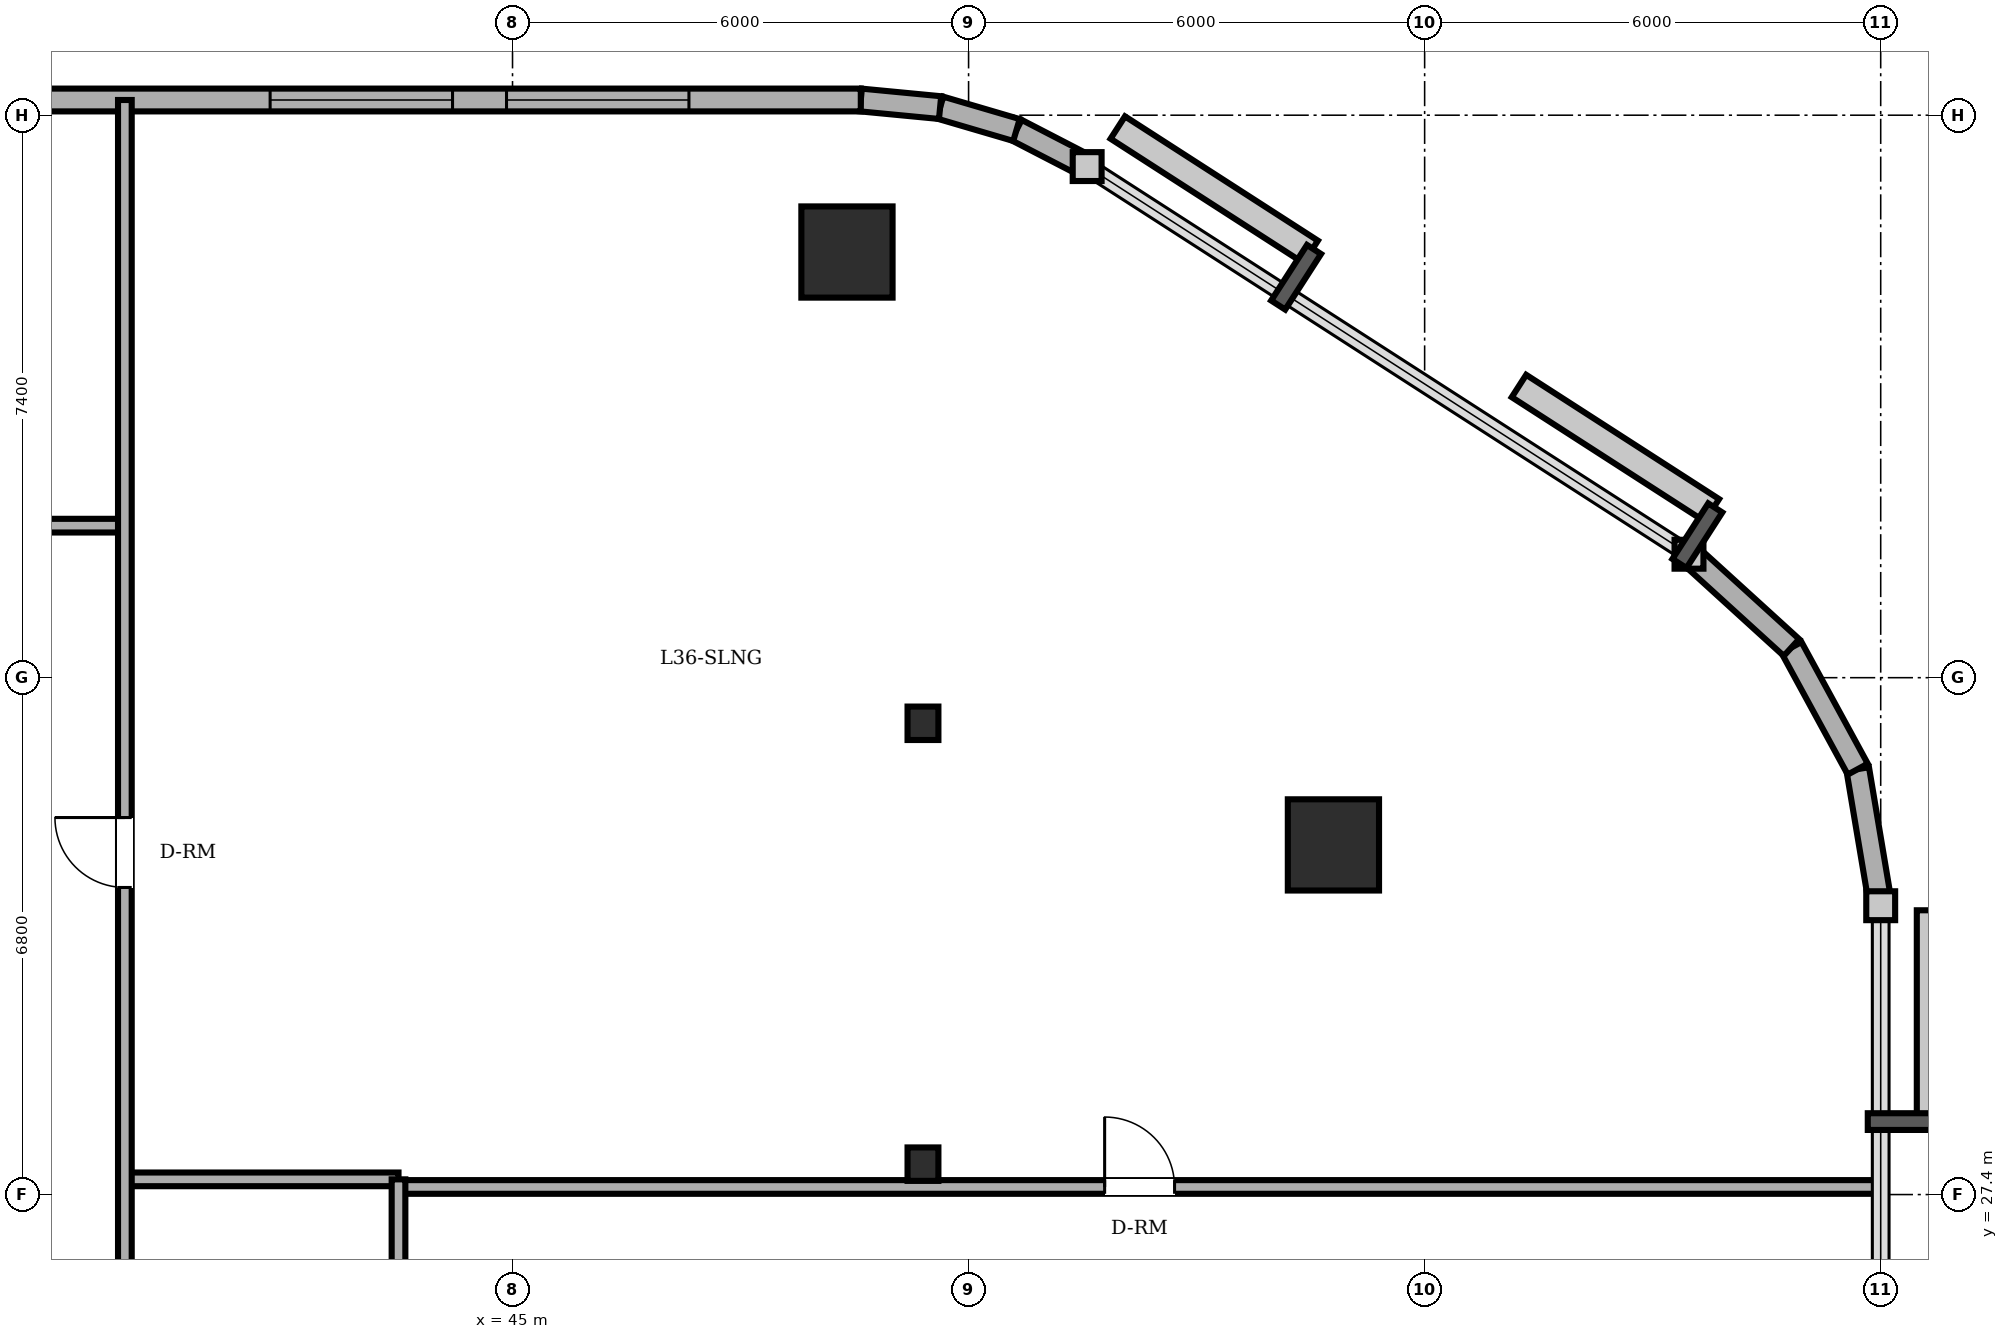
"""IFC4 building model, lengths in metres.
Left out: names, types, materials, properties, quantities, classifications, styles, units other than length and angle.
Written with IfcOpenShell. Run it as: python <this file> out.ifc"""

import sys

from ifc_helpers import new_model, si_unit, direction, frame, frame_2d, origin, origin_2d, place, context, subcontext, project, spatial, rectangle, circle, i_section, extrude, element, fill, save


model = new_model("IFC4")
c1 = context("Model", 3, precision=1e-05, world=origin(), true_north=direction((0.0, 1.0)))
c2 = subcontext(c1, "Body", "Model", "MODEL_VIEW")
j1 = project(units=[si_unit("LENGTHUNIT", "METRE"), si_unit("PLANEANGLEUNIT", "RADIAN")], contexts=[c1])
p1 = place(None, origin())
s1 = spatial("IfcSite", under=j1, at=p1, CompositionType="ELEMENT")
p2 = place(p1, origin())
s2 = spatial("IfcBuilding", under=s1, at=p2, CompositionType="ELEMENT")
p3 = place(p2, frame((0.0, 0.0, 138.7)))
s3 = spatial("IfcBuildingStorey", under=s2, at=p3, CompositionType="ELEMENT", Elevation=138.7)
for number, where, z_axis, x_axis in (
    (1, (55.8, 32.0, 0.0), (0.0, 0.0, 1.0), (1.0, 0.0, 0.0)),
    (2, (49.4, 39.8, 0.0), (0.0, 0.0, 1.0), (1.0, 0.0, 0.0)),
):
    element("IfcColumn", number, at=place(p3, frame(where, z_axis=z_axis, x_axis=x_axis)), inside=s3, PredefinedType="COLUMN", context=c2, shape_type="SweptSolid", body=[
        extrude(circle(Radius=0.6, at=origin_2d()), origin(), (0.0, 0.0, 1.0), 5.1),
    ])
for number, where, z_axis, x_axis in (
    (3, (50.4, 27.8, 0.0), (0.0, 0.0, 1.0), (1.0, 0.0, 0.0)),
    (4, (50.4, 33.6, 0.0), (0.0, 0.0, 1.0), (1.0, 0.0, 0.0)),
):
    element("IfcColumn", number, at=place(p3, frame(where, z_axis=z_axis, x_axis=x_axis)), inside=s3, PredefinedType="COLUMN", context=c2, shape_type="SweptSolid", body=[
        extrude(i_section(OverallWidth=0.406, OverallDepth=0.44, WebThickness=0.024, FlangeThickness=0.039, FilletRadius=0.015, at=origin_2d()), origin(), (0.0, 0.0, 1.0), 5.1),
    ])
p4 = place(p3, frame((63.0, 31.2, 0.0), z_axis=(0.0, 0.0, 1.0), x_axis=(-0.165724081207, 0.986172159873, 0.0)))
e5 = element("IfcWall", 5, at=p4, inside=s3, PredefinedType="SOLIDWALL", context=c2, shape_type="SweptSolid", body=[
    extrude(rectangle(XDim=1.822, YDim=0.3, at=frame_2d((0.911, 0.0))), origin(), (0.0, 0.0, 1.0), 4.9),
])
p5 = place(p3, frame((62.698, 32.997, 0.0), z_axis=(0.0, 0.0, 1.0), x_axis=(-0.478608030646, 0.878028674362, 0.0)))
e6 = element("IfcWall", 6, at=p5, inside=s3, PredefinedType="SOLIDWALL", context=c2, shape_type="SweptSolid", body=[
    extrude(rectangle(XDim=1.822, YDim=0.3, at=frame_2d((0.911, 0.0))), origin(), (0.0, 0.0, 1.0), 4.9),
])
p6 = place(p3, frame((61.826, 34.597, 0.0), z_axis=(0.0, 0.0, 1.0), x_axis=(-0.73947929393, 0.673179302897, 0.0)))
e7 = element("IfcWall", 7, at=p6, inside=s3, PredefinedType="SOLIDWALL", context=c2, shape_type="SweptSolid", body=[
    extrude(rectangle(XDim=1.823, YDim=0.3, at=frame_2d((0.911, 0.0))), origin(), (0.0, 0.0, 1.0), 4.9),
])
p7 = place(p3, frame((52.56, 40.924, 0.0), z_axis=(0.0, 0.0, 1.0), x_axis=(-0.888283247196, 0.459296062198, 0.0)))
e8 = element("IfcWall", 8, at=p7, inside=s3, PredefinedType="SOLIDWALL", context=c2, shape_type="SweptSolid", body=[
    extrude(rectangle(XDim=1.047, YDim=0.3, at=frame_2d((0.523, 0.0))), origin(), (0.0, 0.0, 1.0), 4.9),
])
p8 = place(p3, frame((51.63, 41.405, 0.0), z_axis=(0.0, 0.0, 1.0), x_axis=(-0.959528674476, 0.281610942363, 0.0)))
e9 = element("IfcWall", 9, at=p8, inside=s3, PredefinedType="SOLIDWALL", context=c2, shape_type="SweptSolid", body=[
    extrude(rectangle(XDim=1.047, YDim=0.3, at=frame_2d((0.524, 0.0))), origin(), (0.0, 0.0, 1.0), 4.9),
])
p9 = place(p3, frame((50.625, 41.7, 0.0), z_axis=(0.0, 0.0, 1.0), x_axis=(-0.995426089968, 0.095534807324, 0.0)))
e10 = element("IfcWall", 10, at=p9, inside=s3, PredefinedType="SOLIDWALL", context=c2, shape_type="SweptSolid", body=[
    extrude(rectangle(XDim=1.048, YDim=0.3, at=frame_2d((0.524, 0.0))), origin(), (0.0, 0.0, 1.0), 4.9),
])
p10 = place(p3, frame((49.582, 41.8, 0.0), z_axis=(0.0, 0.0, 1.0), x_axis=(-1.0, 0.0, 0.0)))
e11 = element("IfcWall", 11, at=p10, inside=s3, PredefinedType="SOLIDWALL", context=c2, shape_type="SweptSolid", body=[
    extrude(rectangle(XDim=30.282, YDim=0.3, at=frame_2d((15.141, 0.0))), origin(), (0.0, 0.0, 1.0), 4.9),
])
p11 = place(p10, frame((22.807, 0.0, 0.0)))
e12 = element("IfcOpeningElement", 12, at=p11, cuts=e11, PredefinedType="OPENING", context=c2, shape_type="SweptSolid", body=[
    extrude(rectangle(XDim=0.95, YDim=2.2, at=frame_2d((0.475, 1.1))), frame((0.0, 0.16, 0.0), z_axis=(0.0, -1.0, 0.0), x_axis=(1.0, 0.0, 0.0)), (0.0, 0.0, 1.0), 0.32),
])
p12 = place(p10, frame((2.261, 0.0, 0.85)))
e13 = element("IfcOpeningElement", 13, at=p12, cuts=e11, PredefinedType="OPENING", context=c2, shape_type="SweptSolid", body=[
    extrude(rectangle(XDim=2.4, YDim=2.1, at=frame_2d((1.2, 1.05))), frame((0.0, 0.16, 0.0), z_axis=(0.0, -1.0, 0.0), x_axis=(1.0, 0.0, 0.0)), (0.0, 0.0, 1.0), 0.32),
])
p13 = place(p10, frame((5.371, 0.0, 0.85)))
e14 = element("IfcOpeningElement", 14, at=p13, cuts=e11, PredefinedType="OPENING", context=c2, shape_type="SweptSolid", body=[
    extrude(rectangle(XDim=2.4, YDim=2.1, at=frame_2d((1.2, 1.05))), frame((0.0, 0.16, 0.0), z_axis=(0.0, -1.0, 0.0), x_axis=(1.0, 0.0, 0.0)), (0.0, 0.0, 1.0), 0.32),
])
p14 = place(p10, frame((15.232, 0.0, 0.85)))
e15 = element("IfcOpeningElement", 15, at=p14, cuts=e11, PredefinedType="OPENING", context=c2, shape_type="SweptSolid", body=[
    extrude(rectangle(XDim=2.4, YDim=2.1, at=frame_2d((1.2, 1.05))), frame((0.0, 0.16, 0.0), z_axis=(0.0, -1.0, 0.0), x_axis=(1.0, 0.0, 0.0)), (0.0, 0.0, 1.0), 0.32),
])
p15 = place(p3, frame((43.5, 27.5, 0.0), z_axis=(0.0, 0.0, 1.0), x_axis=(1.0, 0.0, 0.0)))
e16 = element("IfcWall", 16, at=p15, inside=s3, PredefinedType="PARTITIONING", context=c2, shape_type="SweptSolid", body=[
    extrude(rectangle(XDim=19.5, YDim=0.18, at=frame_2d((9.75, 0.0))), origin(), (0.0, 0.0, 1.0), 4.432),
])
p16 = place(p15, frame((9.29, 0.0, 0.0)))
e17 = element("IfcOpeningElement", 17, at=p16, cuts=e16, PredefinedType="OPENING", context=c2, shape_type="SweptSolid", body=[
    extrude(rectangle(XDim=0.92, YDim=2.1, at=frame_2d((0.46, 1.05))), frame((0.0, 0.1, 0.0), z_axis=(0.0, -1.0, 0.0), x_axis=(1.0, 0.0, 0.0)), (0.0, 0.0, 1.0), 0.2),
])
p17 = place(p3, frame((39.9, 27.6, 0.0), z_axis=(0.0, 0.0, 1.0), x_axis=(1.0, 0.0, 0.0)))
e18 = element("IfcWall", 18, at=p17, inside=s3, PredefinedType="PARTITIONING", context=c2, shape_type="SweptSolid", body=[
    extrude(rectangle(XDim=3.6, YDim=0.18, at=frame_2d((1.8, 0.0))), origin(), (0.0, 0.0, 1.0), 4.432),
])
p18 = place(p3, frame((13.8, 36.2, 0.0), z_axis=(0.0, 0.0, 1.0), x_axis=(1.0, 0.0, 0.0)))
e19 = element("IfcWall", 19, at=p18, inside=s3, PredefinedType="PARTITIONING", context=c2, shape_type="SweptSolid", body=[
    extrude(rectangle(XDim=26.1, YDim=0.18, at=frame_2d((13.05, 0.0))), origin(), (0.0, 0.0, 1.0), 4.9),
])
p19 = place(p3, frame((39.9, 6.2, 0.0), z_axis=(0.0, 0.0, 1.0), x_axis=(0.0, 1.0, 0.0)))
e20 = element("IfcWall", 20, at=p19, inside=s3, PredefinedType="PARTITIONING", context=c2, shape_type="SweptSolid", body=[
    extrude(rectangle(XDim=35.6, YDim=0.18, at=frame_2d((17.8, 0.0))), origin(), (0.0, 0.0, 1.0), 4.9),
])
p20 = place(p19, frame((15.825, 0.0, 0.0)))
e21 = element("IfcOpeningElement", 21, at=p20, cuts=e20, PredefinedType="OPENING", context=c2, shape_type="SweptSolid", body=[
    extrude(rectangle(XDim=0.95, YDim=2.15, at=frame_2d((0.475, 1.075))), frame((0.0, 0.1, 0.0), z_axis=(0.0, -1.0, 0.0), x_axis=(1.0, 0.0, 0.0)), (0.0, 0.0, 1.0), 0.2),
])
p21 = place(p19, frame((19.125, 0.0, 0.0)))
e22 = element("IfcOpeningElement", 22, at=p21, cuts=e20, PredefinedType="OPENING", context=c2, shape_type="SweptSolid", body=[
    extrude(rectangle(XDim=0.95, YDim=2.15, at=frame_2d((0.475, 1.075))), frame((0.0, 0.1, 0.0), z_axis=(0.0, -1.0, 0.0), x_axis=(1.0, 0.0, 0.0)), (0.0, 0.0, 1.0), 0.2),
])
p22 = place(p19, frame((25.24, 0.0, 0.0)))
e23 = element("IfcOpeningElement", 23, at=p22, cuts=e20, PredefinedType="OPENING", context=c2, shape_type="SweptSolid", body=[
    extrude(rectangle(XDim=0.92, YDim=2.1, at=frame_2d((0.46, 1.05))), frame((0.0, 0.1, 0.0), z_axis=(0.0, -1.0, 0.0), x_axis=(1.0, 0.0, 0.0)), (0.0, 0.0, 1.0), 0.2),
])
p23 = place(p19, frame((8.24, 0.0, 0.0)))
e24 = element("IfcOpeningElement", 24, at=p23, cuts=e20, PredefinedType="OPENING", context=c2, shape_type="SweptSolid", body=[
    extrude(rectangle(XDim=0.92, YDim=2.1, at=frame_2d((0.46, 1.05))), frame((0.0, 0.1, 0.0), z_axis=(0.0, -1.0, 0.0), x_axis=(1.0, 0.0, 0.0)), (0.0, 0.0, 1.0), 0.2),
])
p24 = place(p3, frame((43.5, 18.0, 0.0), z_axis=(0.0, 0.0, 1.0), x_axis=(0.0, 1.0, 0.0)))
e25 = element("IfcWall", 25, at=p24, inside=s3, PredefinedType="PARTITIONING", context=c2, shape_type="SweptSolid", body=[
    extrude(rectangle(XDim=9.6, YDim=0.18, at=frame_2d((4.8, 0.0))), origin(), (0.0, 0.0, 1.0), 4.9),
])
p25 = place(p12, origin())
e26 = element("IfcWindow", 26, at=p25, inside=s3, PartitioningType="TRIPLE_PANEL_VERTICAL", PredefinedType="WINDOW", context=c2, shape_type="SweptSolid", body=[
    extrude(rectangle(XDim=2.4, YDim=2.1, at=frame_2d((1.2, 1.05))), frame((0.0, 0.03, 0.0), z_axis=(0.0, -1.0, 0.0), x_axis=(1.0, 0.0, 0.0)), (0.0, 0.0, 1.0), 0.06),
])
fill(e13, e26)
p26 = place(p13, origin())
e27 = element("IfcWindow", 27, at=p26, inside=s3, PartitioningType="TRIPLE_PANEL_VERTICAL", PredefinedType="WINDOW", context=c2, shape_type="SweptSolid", body=[
    extrude(rectangle(XDim=2.4, YDim=2.1, at=frame_2d((1.2, 1.05))), frame((0.0, 0.03, 0.0), z_axis=(0.0, -1.0, 0.0), x_axis=(1.0, 0.0, 0.0)), (0.0, 0.0, 1.0), 0.06),
])
fill(e14, e27)
p27 = place(p22, origin())
e28 = element("IfcDoor", 28, at=p27, inside=s3, OperationType="SINGLE_SWING_RIGHT", PredefinedType="DOOR", context=c2, shape_type="SweptSolid", body=[
    extrude(rectangle(XDim=0.92, YDim=2.1, at=frame_2d((0.46, 1.05))), frame((0.0, 0.025, 0.0), z_axis=(0.0, -1.0, 0.0), x_axis=(1.0, 0.0, 0.0)), (0.0, 0.0, 1.0), 0.05),
])
fill(e23, e28)
p28 = place(p16, origin())
e29 = element("IfcDoor", 29, at=p28, inside=s3, OperationType="SINGLE_SWING_LEFT", PredefinedType="DOOR", context=c2, shape_type="SweptSolid", body=[
    extrude(rectangle(XDim=0.92, YDim=2.1, at=frame_2d((0.46, 1.05))), frame((0.0, 0.025, 0.0), z_axis=(0.0, -1.0, 0.0), x_axis=(1.0, 0.0, 0.0)), (0.0, 0.0, 1.0), 0.05),
])
fill(e17, e29)
save(model, sys.argv[1])
